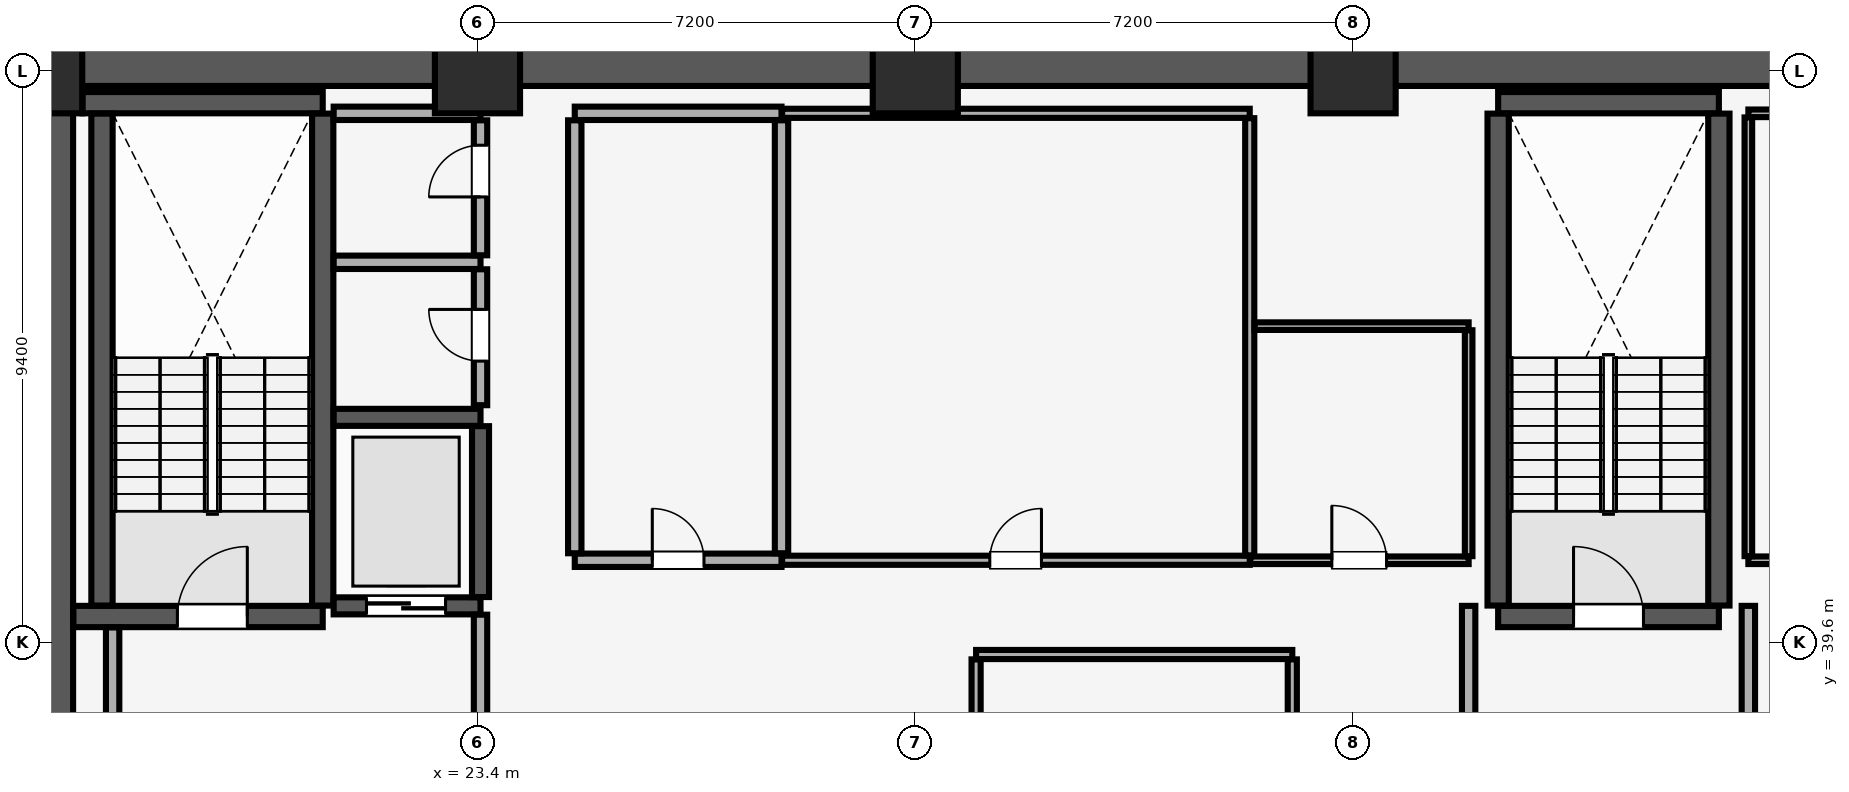
"""IFC4 building model, lengths in metres.
Left out: names, types, materials, properties, quantities, classifications, styles, units other than length and angle.
Written with IfcOpenShell. Run it as: python <this file> out.ifc"""

import sys

from ifc_helpers import new_model, si_unit, direction, frame, frame_2d, origin, origin_2d, place, context, subcontext, project, spatial, rectangle, extrude, element, fill, save


model = new_model("IFC4")
c1 = context("Model", 3, precision=1e-05, world=origin(), true_north=direction((0.0, 1.0)))
c2 = subcontext(c1, "Body", "Model", "MODEL_VIEW")
j1 = project(units=[si_unit("LENGTHUNIT", "METRE"), si_unit("PLANEANGLEUNIT", "RADIAN")], contexts=[c1])
p1 = place(None, origin())
s1 = spatial("IfcSite", under=j1, at=p1, CompositionType="ELEMENT")
p2 = place(p1, origin())
s2 = spatial("IfcBuilding", under=s1, at=p2, CompositionType="ELEMENT")
p3 = place(p2, frame((0.0, 0.0, 19.4)))
s3 = spatial("IfcBuildingStorey", under=s2, at=p3, CompositionType="ELEMENT", Elevation=19.4)
for number, where, z_axis, x_axis in (
    (1, (16.2, 49.0, 0.0), (0.0, 0.0, 1.0), (1.0, 0.0, 0.0)),
    (2, (23.4, 49.0, 0.0), (0.0, 0.0, 1.0), (1.0, 0.0, 0.0)),
    (3, (30.6, 49.0, 0.0), (0.0, 0.0, 1.0), (1.0, 0.0, 0.0)),
    (4, (37.8, 49.0, 0.0), (0.0, 0.0, 1.0), (1.0, 0.0, 0.0)),
):
    element("IfcColumn", number, at=place(p3, frame(where, z_axis=z_axis, x_axis=x_axis)), inside=s3, PredefinedType="COLUMN", context=c2, shape_type="SweptSolid", body=[
        extrude(rectangle(XDim=1.4, YDim=1.4, at=origin_2d()), origin(), (0.0, 0.0, 1.0), 6.28),
    ])
p4 = place(p3, frame((16.2, 49.3, 0.0), z_axis=(0.0, 0.0, 1.0), x_axis=(1.0, 0.0, 0.0)))
e5 = element("IfcWall", 5, at=p4, inside=s3, PredefinedType="SHEAR", context=c2, shape_type="SweptSolid", body=[
    extrude(rectangle(XDim=51.6, YDim=1.1, at=frame_2d((25.8, 0.0))), origin(), (0.0, 0.0, 1.0), 6.28),
])
p5 = place(p3, frame((16.2, 29.4, 0.0), z_axis=(0.0, 0.0, 1.0), x_axis=(0.0, 1.0, 0.0)))
e6 = element("IfcWall", 6, at=p5, inside=s3, PredefinedType="SHEAR", context=c2, shape_type="SweptSolid", body=[
    extrude(rectangle(XDim=19.2, YDim=1.1, at=frame_2d((9.6, 0.0))), origin(), (0.0, 0.0, 1.0), 6.28),
])
p6 = place(p3, frame((16.755, 40.025, 0.0), z_axis=(0.0, 0.0, 1.0), x_axis=(1.0, 0.0, 0.0)))
e7 = element("IfcWall", 7, at=p6, inside=s3, PredefinedType="SHEAR", context=c2, shape_type="SweptSolid", body=[
    extrude(rectangle(XDim=4.1, YDim=0.35, at=frame_2d((2.05, 0.0))), origin(), (0.0, 0.0, 1.0), 6.28),
])
p7 = place(p6, frame((1.71, 0.0, 0.0)))
e8 = element("IfcOpeningElement", 8, at=p7, cuts=e7, PredefinedType="OPENING", context=c2, shape_type="SweptSolid", body=[
    extrude(rectangle(XDim=1.15, YDim=2.15, at=frame_2d((0.575, 1.075))), frame((0.0, 0.185, 0.0), z_axis=(0.0, -1.0, 0.0), x_axis=(1.0, 0.0, 0.0)), (0.0, 0.0, 1.0), 0.37),
])
p8 = place(p3, frame((16.905, 48.475, 0.0), z_axis=(0.0, 0.0, 1.0), x_axis=(1.0, 0.0, 0.0)))
e9 = element("IfcWall", 9, at=p8, inside=s3, PredefinedType="SHEAR", context=c2, shape_type="SweptSolid", body=[
    extrude(rectangle(XDim=3.95, YDim=0.35, at=frame_2d((1.975, 0.0))), origin(), (0.0, 0.0, 1.0), 6.28),
])
for number, where, z_axis, x_axis in (
    (10, (17.225, 40.205, 0.0), (0.0, 0.0, 1.0), (0.0, 1.0, 0.0)),
    (11, (20.855, 40.205, 0.0), (0.0, 0.0, 1.0), (0.0, 1.0, 0.0)),
):
    element("IfcWall", number, at=place(p3, frame(where, z_axis=z_axis, x_axis=x_axis)), inside=s3, PredefinedType="SHEAR", context=c2, shape_type="SweptSolid", body=[
        extrude(rectangle(XDim=8.09, YDim=0.35, at=frame_2d((4.045, 0.0))), origin(), (0.0, 0.0, 1.0), 6.28),
    ])
p9 = place(p3, frame((40.185, 40.025, 0.0), z_axis=(0.0, 0.0, 1.0), x_axis=(1.0, 0.0, 0.0)))
e12 = element("IfcWall", 12, at=p9, inside=s3, PredefinedType="SHEAR", context=c2, shape_type="SweptSolid", body=[
    extrude(rectangle(XDim=3.63, YDim=0.35, at=frame_2d((1.815, 0.0))), origin(), (0.0, 0.0, 1.0), 6.28),
])
p10 = place(p9, frame((1.24, 0.0, 0.0)))
e13 = element("IfcOpeningElement", 13, at=p10, cuts=e12, PredefinedType="OPENING", context=c2, shape_type="SweptSolid", body=[
    extrude(rectangle(XDim=1.15, YDim=2.15, at=frame_2d((0.575, 1.075))), frame((0.0, 0.185, 0.0), z_axis=(0.0, -1.0, 0.0), x_axis=(1.0, 0.0, 0.0)), (0.0, 0.0, 1.0), 0.37),
])
p11 = place(p3, frame((40.185, 48.475, 0.0), z_axis=(0.0, 0.0, 1.0), x_axis=(1.0, 0.0, 0.0)))
e14 = element("IfcWall", 14, at=p11, inside=s3, PredefinedType="SHEAR", context=c2, shape_type="SweptSolid", body=[
    extrude(rectangle(XDim=3.63, YDim=0.35, at=frame_2d((1.815, 0.0))), origin(), (0.0, 0.0, 1.0), 6.28),
])
for number, where, z_axis, x_axis in (
    (15, (40.185, 40.205, 0.0), (0.0, 0.0, 1.0), (0.0, 1.0, 0.0)),
    (16, (43.815, 40.205, 0.0), (0.0, 0.0, 1.0), (0.0, 1.0, 0.0)),
):
    element("IfcWall", number, at=place(p3, frame(where, z_axis=z_axis, x_axis=x_axis)), inside=s3, PredefinedType="SHEAR", context=c2, shape_type="SweptSolid", body=[
        extrude(rectangle(XDim=8.09, YDim=0.35, at=frame_2d((4.045, 0.0))), origin(), (0.0, 0.0, 1.0), 6.28),
    ])
p12 = place(p3, frame((21.035, 40.2, 0.0), z_axis=(0.0, 0.0, 1.0), x_axis=(1.0, 0.0, 0.0)))
e17 = element("IfcWall", 17, at=p12, inside=s3, PredefinedType="SHEAR", context=c2, shape_type="SweptSolid", body=[
    extrude(rectangle(XDim=2.415, YDim=0.28, at=frame_2d((1.208, 0.0))), origin(), (0.0, 0.0, 1.0), 6.28),
])
p13 = place(p12, frame((0.54, 0.0, 0.0)))
e18 = element("IfcOpeningElement", 18, at=p13, cuts=e17, PredefinedType="OPENING", context=c2, shape_type="SweptSolid", body=[
    extrude(rectangle(XDim=1.3, YDim=2.3, at=frame_2d((0.65, 1.15))), frame((0.0, 0.15, 0.0), z_axis=(0.0, -1.0, 0.0), x_axis=(1.0, 0.0, 0.0)), (0.0, 0.0, 1.0), 0.3),
])
p14 = place(p3, frame((21.035, 43.3, 0.0), z_axis=(0.0, 0.0, 1.0), x_axis=(1.0, 0.0, 0.0)))
e19 = element("IfcWall", 19, at=p14, inside=s3, PredefinedType="SHEAR", context=c2, shape_type="SweptSolid", body=[
    extrude(rectangle(XDim=2.415, YDim=0.28, at=frame_2d((1.208, 0.0))), origin(), (0.0, 0.0, 1.0), 6.28),
])
p15 = place(p3, frame((23.45, 40.345, 0.0), z_axis=(0.0, 0.0, 1.0), x_axis=(0.0, 1.0, 0.0)))
e20 = element("IfcWall", 20, at=p15, inside=s3, PredefinedType="SHEAR", context=c2, shape_type="SweptSolid", body=[
    extrude(rectangle(XDim=2.81, YDim=0.28, at=frame_2d((1.405, 0.0))), origin(), (0.0, 0.0, 1.0), 6.28),
])
p16 = place(p3, frame((17.4, 34.415, 0.0), z_axis=(0.0, 0.0, 1.0), x_axis=(0.0, 1.0, 0.0)))
e21 = element("IfcWall", 21, at=p16, inside=s3, PredefinedType="PARTITIONING", context=c2, shape_type="SweptSolid", body=[
    extrude(rectangle(XDim=5.43, YDim=0.22, at=frame_2d((2.715, 0.0))), origin(), (0.0, 0.0, 1.0), 6.28),
])
p17 = place(p3, frame((23.45, 34.415, 0.0), z_axis=(0.0, 0.0, 1.0), x_axis=(0.0, 1.0, 0.0)))
e22 = element("IfcWall", 22, at=p17, inside=s3, PredefinedType="PARTITIONING", context=c2, shape_type="SweptSolid", body=[
    extrude(rectangle(XDim=5.64, YDim=0.22, at=frame_2d((2.82, 0.0))), origin(), (0.0, 0.0, 1.0), 6.28),
])
for number, where, z_axis, x_axis in (
    (23, (39.7, 34.415, 0.0), (0.0, 0.0, 1.0), (0.0, 1.0, 0.0)),
    (24, (44.3, 34.415, 0.0), (0.0, 0.0, 1.0), (0.0, 1.0, 0.0)),
):
    element("IfcWall", number, at=place(p3, frame(where, z_axis=z_axis, x_axis=x_axis)), inside=s3, PredefinedType="PARTITIONING", context=c2, shape_type="SweptSolid", body=[
        extrude(rectangle(XDim=5.785, YDim=0.22, at=frame_2d((2.893, 0.0))), origin(), (0.0, 0.0, 1.0), 6.28),
    ])
p18 = place(p3, frame((21.035, 45.85, 0.0), z_axis=(0.0, 0.0, 1.0), x_axis=(1.0, 0.0, 0.0)))
e25 = element("IfcWall", 25, at=p18, inside=s3, PredefinedType="PARTITIONING", context=c2, shape_type="SweptSolid", body=[
    extrude(rectangle(XDim=2.415, YDim=0.22, at=frame_2d((1.208, 0.0))), origin(), (0.0, 0.0, 1.0), 6.28),
])
p19 = place(p3, frame((23.45, 43.5, 0.0), z_axis=(0.0, 0.0, 1.0), x_axis=(0.0, 1.0, 0.0)))
e26 = element("IfcWall", 26, at=p19, inside=s3, PredefinedType="PARTITIONING", context=c2, shape_type="SweptSolid", body=[
    extrude(rectangle(XDim=2.235, YDim=0.22, at=frame_2d((1.118, 0.0))), origin(), (0.0, 0.0, 1.0), 6.28),
])
p20 = place(p19, frame((0.725, 0.0, 0.0)))
e27 = element("IfcOpeningElement", 27, at=p20, cuts=e26, PredefinedType="OPENING", context=c2, shape_type="SweptSolid", body=[
    extrude(rectangle(XDim=0.85, YDim=2.1, at=frame_2d((0.425, 1.05))), frame((0.0, 0.12, 0.0), z_axis=(0.0, -1.0, 0.0), x_axis=(1.0, 0.0, 0.0)), (0.0, 0.0, 1.0), 0.24),
])
p21 = place(p3, frame((21.035, 48.3, 0.0), z_axis=(0.0, 0.0, 1.0), x_axis=(1.0, 0.0, 0.0)))
e28 = element("IfcWall", 28, at=p21, inside=s3, PredefinedType="PARTITIONING", context=c2, shape_type="SweptSolid", body=[
    extrude(rectangle(XDim=2.415, YDim=0.22, at=frame_2d((1.208, 0.0))), origin(), (0.0, 0.0, 1.0), 6.28),
])
p22 = place(p3, frame((23.45, 45.965, 0.0), z_axis=(0.0, 0.0, 1.0), x_axis=(0.0, 1.0, 0.0)))
e29 = element("IfcWall", 29, at=p22, inside=s3, PredefinedType="PARTITIONING", context=c2, shape_type="SweptSolid", body=[
    extrude(rectangle(XDim=2.22, YDim=0.22, at=frame_2d((1.11, 0.0))), origin(), (0.0, 0.0, 1.0), 6.28),
])
p23 = place(p22, frame((0.96, 0.0, 0.0)))
e30 = element("IfcOpeningElement", 30, at=p23, cuts=e29, PredefinedType="OPENING", context=c2, shape_type="SweptSolid", body=[
    extrude(rectangle(XDim=0.85, YDim=2.1, at=frame_2d((0.425, 1.05))), frame((0.0, 0.12, 0.0), z_axis=(0.0, -1.0, 0.0), x_axis=(1.0, 0.0, 0.0)), (0.0, 0.0, 1.0), 0.24),
])
p24 = place(p3, frame((31.6, 39.4, 0.0), z_axis=(0.0, 0.0, 1.0), x_axis=(1.0, 0.0, 0.0)))
e31 = element("IfcWall", 31, at=p24, inside=s3, PredefinedType="PARTITIONING", context=c2, shape_type="SweptSolid", body=[
    extrude(rectangle(XDim=5.2, YDim=0.15, at=frame_2d((2.6, 0.0))), origin(), (0.0, 0.0, 1.0), 6.28),
])
for number, where, z_axis, x_axis in (
    (32, (31.6, 34.38, 0.0), (0.0, 0.0, 1.0), (0.0, 1.0, 0.0)),
    (33, (36.8, 34.38, 0.0), (0.0, 0.0, 1.0), (0.0, 1.0, 0.0)),
):
    element("IfcWall", number, at=place(p3, frame(where, z_axis=z_axis, x_axis=x_axis)), inside=s3, PredefinedType="PARTITIONING", context=c2, shape_type="SweptSolid", body=[
        extrude(rectangle(XDim=4.94, YDim=0.15, at=frame_2d((2.47, 0.0))), origin(), (0.0, 0.0, 1.0), 6.28),
    ])
p25 = place(p3, frame((25.0, 40.95, 0.0), z_axis=(0.0, 0.0, 1.0), x_axis=(1.0, 0.0, 0.0)))
e34 = element("IfcWall", 34, at=p25, inside=s3, PredefinedType="PARTITIONING", context=c2, shape_type="SweptSolid", body=[
    extrude(rectangle(XDim=3.4, YDim=0.22, at=frame_2d((1.7, 0.0))), origin(), (0.0, 0.0, 1.0), 6.28),
])
p26 = place(p25, frame((1.275, 0.0, 0.0)))
e35 = element("IfcOpeningElement", 35, at=p26, cuts=e34, PredefinedType="OPENING", context=c2, shape_type="SweptSolid", body=[
    extrude(rectangle(XDim=0.85, YDim=2.1, at=frame_2d((0.425, 1.05))), frame((0.0, 0.12, 0.0), z_axis=(0.0, -1.0, 0.0), x_axis=(1.0, 0.0, 0.0)), (0.0, 0.0, 1.0), 0.24),
])
p27 = place(p3, frame((25.0, 48.3, 0.0), z_axis=(0.0, 0.0, 1.0), x_axis=(1.0, 0.0, 0.0)))
e36 = element("IfcWall", 36, at=p27, inside=s3, PredefinedType="PARTITIONING", context=c2, shape_type="SweptSolid", body=[
    extrude(rectangle(XDim=3.4, YDim=0.22, at=frame_2d((1.7, 0.0))), origin(), (0.0, 0.0, 1.0), 6.28),
])
for number, where, z_axis, x_axis in (
    (37, (25.0, 41.065, 0.0), (0.0, 0.0, 1.0), (0.0, 1.0, 0.0)),
    (38, (28.4, 41.065, 0.0), (0.0, 0.0, 1.0), (0.0, 1.0, 0.0)),
):
    element("IfcWall", number, at=place(p3, frame(where, z_axis=z_axis, x_axis=x_axis)), inside=s3, PredefinedType="PARTITIONING", context=c2, shape_type="SweptSolid", body=[
        extrude(rectangle(XDim=7.12, YDim=0.22, at=frame_2d((3.56, 0.0))), origin(), (0.0, 0.0, 1.0), 6.28),
    ])
p28 = place(p3, frame((28.41, 40.95, 0.0), z_axis=(0.0, 0.0, 1.0), x_axis=(1.0, 0.0, 0.0)))
e39 = element("IfcWall", 39, at=p28, inside=s3, PredefinedType="PARTITIONING", context=c2, shape_type="SweptSolid", body=[
    extrude(rectangle(XDim=7.69, YDim=0.15, at=frame_2d((3.845, 0.0))), origin(), (0.0, 0.0, 1.0), 6.28),
])
p29 = place(p28, frame((3.415, 0.0, 0.0)))
e40 = element("IfcOpeningElement", 40, at=p29, cuts=e39, PredefinedType="OPENING", context=c2, shape_type="SweptSolid", body=[
    extrude(rectangle(XDim=0.85, YDim=2.1, at=frame_2d((0.425, 1.05))), frame((0.0, 0.085, 0.0), z_axis=(0.0, -1.0, 0.0), x_axis=(1.0, 0.0, 0.0)), (0.0, 0.0, 1.0), 0.17),
])
p30 = place(p3, frame((28.41, 48.3, 0.0), z_axis=(0.0, 0.0, 1.0), x_axis=(1.0, 0.0, 0.0)))
e41 = element("IfcWall", 41, at=p30, inside=s3, PredefinedType="PARTITIONING", context=c2, shape_type="SweptSolid", body=[
    extrude(rectangle(XDim=7.69, YDim=0.15, at=frame_2d((3.845, 0.0))), origin(), (0.0, 0.0, 1.0), 6.28),
])
p31 = place(p3, frame((36.1, 41.03, 0.0), z_axis=(0.0, 0.0, 1.0), x_axis=(0.0, 1.0, 0.0)))
e42 = element("IfcWall", 42, at=p31, inside=s3, PredefinedType="PARTITIONING", context=c2, shape_type="SweptSolid", body=[
    extrude(rectangle(XDim=7.19, YDim=0.15, at=frame_2d((3.595, 0.0))), origin(), (0.0, 0.0, 1.0), 6.28),
])
p32 = place(p3, frame((36.11, 40.95, 0.0), z_axis=(0.0, 0.0, 1.0), x_axis=(1.0, 0.0, 0.0)))
e43 = element("IfcWall", 43, at=p32, inside=s3, PredefinedType="PARTITIONING", context=c2, shape_type="SweptSolid", body=[
    extrude(rectangle(XDim=3.59, YDim=0.125, at=frame_2d((1.795, 0.0))), origin(), (0.0, 0.0, 1.0), 6.28),
])
p33 = place(p32, frame((1.34, 0.0, 0.0)))
e44 = element("IfcOpeningElement", 44, at=p33, cuts=e43, PredefinedType="OPENING", context=c2, shape_type="SweptSolid", body=[
    extrude(rectangle(XDim=0.9, YDim=2.1, at=frame_2d((0.45, 1.05))), frame((0.0, 0.073, 0.0), z_axis=(0.0, -1.0, 0.0), x_axis=(1.0, 0.0, 0.0)), (0.0, 0.0, 1.0), 0.145),
])
p34 = place(p3, frame((36.18, 44.8, 0.0), z_axis=(0.0, 0.0, 1.0), x_axis=(1.0, 0.0, 0.0)))
e45 = element("IfcWall", 45, at=p34, inside=s3, PredefinedType="PARTITIONING", context=c2, shape_type="SweptSolid", body=[
    extrude(rectangle(XDim=3.52, YDim=0.125, at=frame_2d((1.76, 0.0))), origin(), (0.0, 0.0, 1.0), 6.28),
])
p35 = place(p3, frame((39.7, 41.018, 0.0), z_axis=(0.0, 0.0, 1.0), x_axis=(0.0, 1.0, 0.0)))
e46 = element("IfcWall", 46, at=p35, inside=s3, PredefinedType="PARTITIONING", context=c2, shape_type="SweptSolid", body=[
    extrude(rectangle(XDim=3.715, YDim=0.125, at=frame_2d((1.857, 0.0))), origin(), (0.0, 0.0, 1.0), 6.28),
])
p36 = place(p3, frame((44.3, 40.95, 0.0), z_axis=(0.0, 0.0, 1.0), x_axis=(1.0, 0.0, 0.0)))
e47 = element("IfcWall", 47, at=p36, inside=s3, PredefinedType="PARTITIONING", context=c2, shape_type="SweptSolid", body=[
    extrude(rectangle(XDim=5.1, YDim=0.125, at=frame_2d((2.55, 0.0))), origin(), (0.0, 0.0, 1.0), 6.28),
])
p37 = place(p36, frame((2.85, 0.0, 0.0)))
e48 = element("IfcOpeningElement", 48, at=p37, cuts=e47, PredefinedType="OPENING", context=c2, shape_type="SweptSolid", body=[
    extrude(rectangle(XDim=0.9, YDim=2.1, at=frame_2d((0.45, 1.05))), frame((0.0, 0.073, 0.0), z_axis=(0.0, -1.0, 0.0), x_axis=(1.0, 0.0, 0.0)), (0.0, 0.0, 1.0), 0.145),
])
p38 = place(p3, frame((44.3, 48.3, 0.0), z_axis=(0.0, 0.0, 1.0), x_axis=(1.0, 0.0, 0.0)))
e49 = element("IfcWall", 49, at=p38, inside=s3, PredefinedType="PARTITIONING", context=c2, shape_type="SweptSolid", body=[
    extrude(rectangle(XDim=5.1, YDim=0.125, at=frame_2d((2.55, 0.0))), origin(), (0.0, 0.0, 1.0), 6.28),
])
p39 = place(p3, frame((44.3, 41.018, 0.0), z_axis=(0.0, 0.0, 1.0), x_axis=(0.0, 1.0, 0.0)))
e50 = element("IfcWall", 50, at=p39, inside=s3, PredefinedType="PARTITIONING", context=c2, shape_type="SweptSolid", body=[
    extrude(rectangle(XDim=7.215, YDim=0.125, at=frame_2d((3.607, 0.0))), origin(), (0.0, 0.0, 1.0), 6.28),
])
p40 = place(p7, origin())
e51 = element("IfcDoor", 51, at=p40, inside=s3, OperationType="SINGLE_SWING_RIGHT", PredefinedType="DOOR", context=c2, shape_type="SweptSolid", body=[
    extrude(rectangle(XDim=1.15, YDim=2.15, at=frame_2d((0.575, 1.075))), frame((0.0, 0.025, 0.0), z_axis=(0.0, -1.0, 0.0), x_axis=(1.0, 0.0, 0.0)), (0.0, 0.0, 1.0), 0.05),
])
fill(e8, e51)
p41 = place(p10, origin())
e52 = element("IfcDoor", 52, at=p41, inside=s3, OperationType="SINGLE_SWING_LEFT", PredefinedType="DOOR", context=c2, shape_type="SweptSolid", body=[
    extrude(rectangle(XDim=1.15, YDim=2.15, at=frame_2d((0.575, 1.075))), frame((0.0, 0.025, 0.0), z_axis=(0.0, -1.0, 0.0), x_axis=(1.0, 0.0, 0.0)), (0.0, 0.0, 1.0), 0.05),
])
fill(e13, e52)
p42 = place(p13, origin())
e53 = element("IfcDoor", 53, at=p42, inside=s3, OperationType="DOUBLE_DOOR_SLIDING", PredefinedType="DOOR", context=c2, shape_type="SweptSolid", body=[
    extrude(rectangle(XDim=1.3, YDim=2.3, at=frame_2d((0.65, 1.15))), frame((0.0, 0.025, 0.0), z_axis=(0.0, -1.0, 0.0), x_axis=(1.0, 0.0, 0.0)), (0.0, 0.0, 1.0), 0.05),
])
fill(e18, e53)
p43 = place(p20, origin())
e54 = element("IfcDoor", 54, at=p43, inside=s3, OperationType="SINGLE_SWING_RIGHT", PredefinedType="DOOR", context=c2, shape_type="SweptSolid", body=[
    extrude(rectangle(XDim=0.85, YDim=2.1, at=frame_2d((0.425, 1.05))), frame((0.0, 0.025, 0.0), z_axis=(0.0, -1.0, 0.0), x_axis=(1.0, 0.0, 0.0)), (0.0, 0.0, 1.0), 0.05),
])
fill(e27, e54)
p44 = place(p23, origin())
e55 = element("IfcDoor", 55, at=p44, inside=s3, OperationType="SINGLE_SWING_LEFT", PredefinedType="DOOR", context=c2, shape_type="SweptSolid", body=[
    extrude(rectangle(XDim=0.85, YDim=2.1, at=frame_2d((0.425, 1.05))), frame((0.0, 0.025, 0.0), z_axis=(0.0, -1.0, 0.0), x_axis=(1.0, 0.0, 0.0)), (0.0, 0.0, 1.0), 0.05),
])
fill(e30, e55)
p45 = place(p26, origin())
e56 = element("IfcDoor", 56, at=p45, inside=s3, OperationType="SINGLE_SWING_LEFT", PredefinedType="DOOR", context=c2, shape_type="SweptSolid", body=[
    extrude(rectangle(XDim=0.85, YDim=2.1, at=frame_2d((0.425, 1.05))), frame((0.0, 0.025, 0.0), z_axis=(0.0, -1.0, 0.0), x_axis=(1.0, 0.0, 0.0)), (0.0, 0.0, 1.0), 0.05),
])
fill(e35, e56)
p46 = place(p29, origin())
e57 = element("IfcDoor", 57, at=p46, inside=s3, OperationType="SINGLE_SWING_RIGHT", PredefinedType="DOOR", context=c2, shape_type="SweptSolid", body=[
    extrude(rectangle(XDim=0.85, YDim=2.1, at=frame_2d((0.425, 1.05))), frame((0.0, 0.025, 0.0), z_axis=(0.0, -1.0, 0.0), x_axis=(1.0, 0.0, 0.0)), (0.0, 0.0, 1.0), 0.05),
])
fill(e40, e57)
p47 = place(p33, origin())
e58 = element("IfcDoor", 58, at=p47, inside=s3, OperationType="SINGLE_SWING_LEFT", PredefinedType="DOOR", context=c2, shape_type="SweptSolid", body=[
    extrude(rectangle(XDim=0.9, YDim=2.1, at=frame_2d((0.45, 1.05))), frame((0.0, 0.025, 0.0), z_axis=(0.0, -1.0, 0.0), x_axis=(1.0, 0.0, 0.0)), (0.0, 0.0, 1.0), 0.05),
])
fill(e44, e58)
save(model, sys.argv[1])
